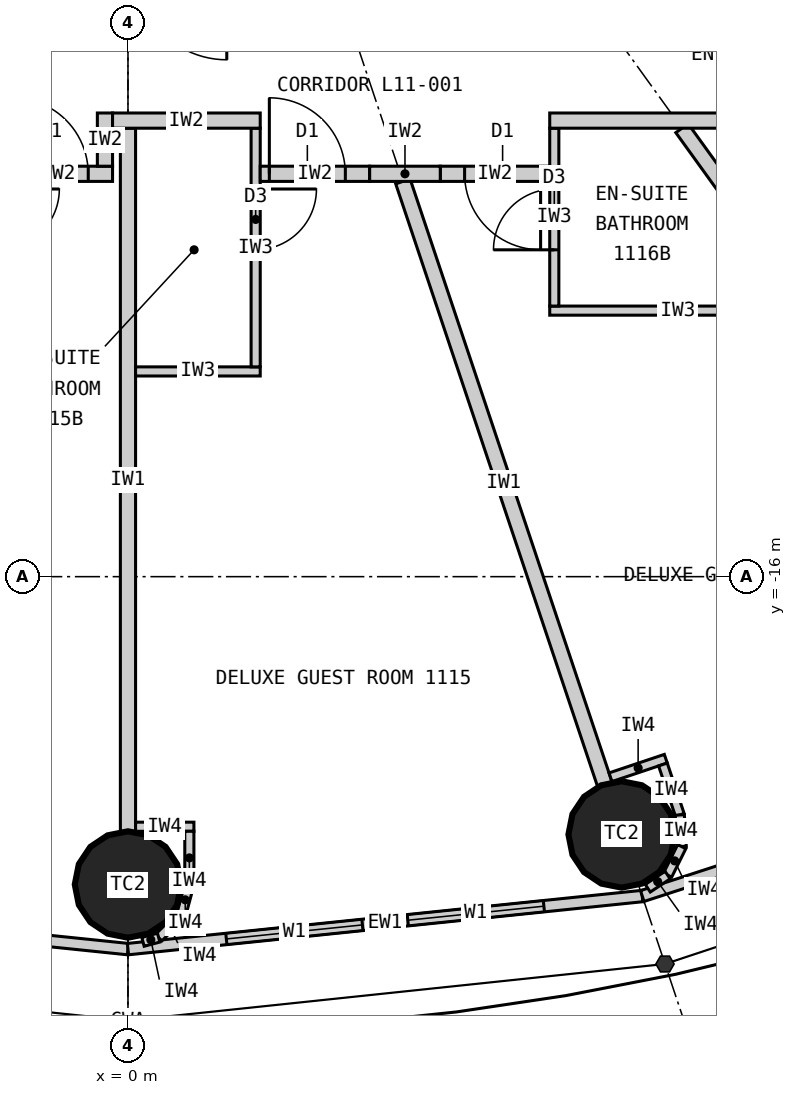
"""IFC4 building model, lengths in metres.
Left out: names, types, materials, properties, quantities, classifications, styles, units other than length and angle.
Written with IfcOpenShell. Run it as: python <this file> out.ifc"""

import sys

from ifc_helpers import new_model, si_unit, direction, frame, frame_2d, origin, origin_2d, place, context, subcontext, project, spatial, rectangle, circle, extrude, element, fill, save


model = new_model("IFC4")
c1 = context("Model", 3, precision=1e-05, world=origin(), true_north=direction((0.0, 1.0)))
c2 = subcontext(c1, "Body", "Model", "MODEL_VIEW")
j1 = project(units=[si_unit("LENGTHUNIT", "METRE"), si_unit("PLANEANGLEUNIT", "RADIAN")], contexts=[c1])
p1 = place(None, origin())
s1 = spatial("IfcSite", under=j1, at=p1, CompositionType="ELEMENT")
p2 = place(p1, origin())
s2 = spatial("IfcBuilding", under=s1, at=p2, CompositionType="ELEMENT")
p3 = place(p2, frame((0.0, 0.0, 50.7)))
s3 = spatial("IfcBuildingStorey", under=s2, at=p3, CompositionType="ELEMENT", Elevation=50.7)
for number, where, z_axis, x_axis in (
    (1, (0.0, -20.05, 0.0), (0.0, 0.0, 1.0), (1.0, 0.0, 0.0)),
    (2, (6.495, -19.391, 0.0), (0.0, 0.0, 1.0), (1.0, 0.0, 0.0)),
):
    element("IfcColumn", number, at=place(p3, frame(where, z_axis=z_axis, x_axis=x_axis)), inside=s3, PredefinedType="COLUMN", context=c2, shape_type="SweptSolid", body=[
        extrude(circle(Radius=0.7, at=origin_2d()), origin(), (0.0, 0.0, 1.0), 3.3),
    ])
p4 = place(p3, frame((-6.766, -20.202, 0.0), z_axis=(0.0, 0.0, 1.0), x_axis=(0.994721394369, -0.102612609291, 0.0)))
e3 = element("IfcWall", 3, at=p4, inside=s3, PredefinedType="ELEMENTEDWALL", context=c2, shape_type="SweptSolid", body=[
    extrude(rectangle(XDim=6.802, YDim=0.15, at=frame_2d((3.401, 0.0))), origin(), (0.0, 0.0, 1.0), 3.12),
])
p5 = place(p4, frame((1.301, 0.0, 0.9)))
e4 = element("IfcOpeningElement", 4, at=p5, cuts=e3, PredefinedType="OPENING", context=c2, shape_type="SweptSolid", body=[
    extrude(rectangle(XDim=1.8, YDim=1.9, at=frame_2d((0.9, 0.95))), frame((0.0, 0.085, 0.0), z_axis=(0.0, -1.0, 0.0), x_axis=(1.0, 0.0, 0.0)), (0.0, 0.0, 1.0), 0.17),
])
p6 = place(p4, frame((3.701, 0.0, 0.9)))
e5 = element("IfcOpeningElement", 5, at=p6, cuts=e3, PredefinedType="OPENING", context=c2, shape_type="SweptSolid", body=[
    extrude(rectangle(XDim=1.8, YDim=1.9, at=frame_2d((0.9, 0.95))), frame((0.0, 0.085, 0.0), z_axis=(0.0, -1.0, 0.0), x_axis=(1.0, 0.0, 0.0)), (0.0, 0.0, 1.0), 0.17),
])
p7 = place(p3, frame((0.0, -20.9, 0.0), z_axis=(0.0, 0.0, 1.0), x_axis=(0.994721394369, 0.102612609291, 0.0)))
e6 = element("IfcWall", 6, at=p7, inside=s3, PredefinedType="ELEMENTEDWALL", context=c2, shape_type="SweptSolid", body=[
    extrude(rectangle(XDim=6.802, YDim=0.15, at=frame_2d((3.401, 0.0))), origin(), (0.0, 0.0, 1.0), 3.12),
])
p8 = place(p7, frame((1.301, 0.0, 0.9)))
e7 = element("IfcOpeningElement", 7, at=p8, cuts=e6, PredefinedType="OPENING", context=c2, shape_type="SweptSolid", body=[
    extrude(rectangle(XDim=1.8, YDim=1.9, at=frame_2d((0.9, 0.95))), frame((0.0, 0.085, 0.0), z_axis=(0.0, -1.0, 0.0), x_axis=(1.0, 0.0, 0.0)), (0.0, 0.0, 1.0), 0.17),
])
p9 = place(p7, frame((3.701, 0.0, 0.9)))
e8 = element("IfcOpeningElement", 8, at=p9, cuts=e6, PredefinedType="OPENING", context=c2, shape_type="SweptSolid", body=[
    extrude(rectangle(XDim=1.8, YDim=1.9, at=frame_2d((0.9, 0.95))), frame((0.0, 0.085, 0.0), z_axis=(0.0, -1.0, 0.0), x_axis=(1.0, 0.0, 0.0)), (0.0, 0.0, 1.0), 0.17),
])
p10 = place(p3, frame((6.766, -20.202, 0.0), z_axis=(0.0, 0.0, 1.0), x_axis=(0.951137534625, 0.308767534285, 0.0)))
e9 = element("IfcWall", 9, at=p10, inside=s3, PredefinedType="ELEMENTEDWALL", context=c2, shape_type="SweptSolid", body=[
    extrude(rectangle(XDim=6.655, YDim=0.15, at=frame_2d((3.328, 0.0))), origin(), (0.0, 0.0, 1.0), 3.12),
])
p11 = place(p10, frame((1.228, 0.0, 0.9)))
e10 = element("IfcOpeningElement", 10, at=p11, cuts=e9, PredefinedType="OPENING", context=c2, shape_type="SweptSolid", body=[
    extrude(rectangle(XDim=1.8, YDim=1.9, at=frame_2d((0.9, 0.95))), frame((0.0, 0.085, 0.0), z_axis=(0.0, -1.0, 0.0), x_axis=(1.0, 0.0, 0.0)), (0.0, 0.0, 1.0), 0.17),
])
p12 = place(p10, frame((3.628, 0.0, 0.9)))
e11 = element("IfcOpeningElement", 11, at=p12, cuts=e9, PredefinedType="OPENING", context=c2, shape_type="SweptSolid", body=[
    extrude(rectangle(XDim=1.8, YDim=1.9, at=frame_2d((0.9, 0.95))), frame((0.0, 0.085, 0.0), z_axis=(0.0, -1.0, 0.0), x_axis=(1.0, 0.0, 0.0)), (0.0, 0.0, 1.0), 0.17),
])
p13 = place(p3, frame((0.0, -10.1, 0.0), z_axis=(0.0, 0.0, 1.0), x_axis=(0.0, -1.0, 0.0)))
e12 = element("IfcWall", 12, at=p13, inside=s3, PredefinedType="PARTITIONING", context=c2, shape_type="SweptSolid", body=[
    extrude(rectangle(XDim=9.25, YDim=0.2, at=frame_2d((4.625, 0.0))), origin(), (0.0, 0.0, 1.0), 2.32),
])
p14 = place(p3, frame((3.617, -10.8, 0.0), z_axis=(0.0, 0.0, 1.0), x_axis=(0.317576599239, -0.948232621046, 0.0)))
e13 = element("IfcWall", 13, at=p14, inside=s3, PredefinedType="PARTITIONING", context=c2, shape_type="SweptSolid", body=[
    extrude(rectangle(XDim=8.36, YDim=0.2, at=frame_2d((4.18, 0.0))), origin(), (0.0, 0.0, 1.0), 2.32),
])
p15 = place(p3, frame((7.289, -10.1, 0.0), z_axis=(0.0, 0.0, 1.0), x_axis=(0.585198353053, -0.810890182197, 0.0)))
e14 = element("IfcWall", 14, at=p15, inside=s3, PredefinedType="PARTITIONING", context=c2, shape_type="SweptSolid", body=[
    extrude(rectangle(XDim=8.36, YDim=0.2, at=frame_2d((4.18, 0.0))), origin(), (0.0, 0.0, 1.0), 2.32),
])
p16 = place(p3, frame((0.1, -13.3, 0.0), z_axis=(0.0, 0.0, 1.0), x_axis=(1.0, 0.0, 0.0)))
e15 = element("IfcWall", 15, at=p16, inside=s3, PredefinedType="PARTITIONING", context=c2, shape_type="SweptSolid", body=[
    extrude(rectangle(XDim=1.64, YDim=0.12, at=frame_2d((0.82, 0.0))), origin(), (0.0, 0.0, 1.0), 3.12),
])
p17 = place(p3, frame((1.68, -10.1, 0.0), z_axis=(0.0, 0.0, 1.0), x_axis=(0.0, -1.0, 0.0)))
e16 = element("IfcWall", 16, at=p17, inside=s3, PredefinedType="PARTITIONING", context=c2, shape_type="SweptSolid", body=[
    extrude(rectangle(XDim=3.14, YDim=0.12, at=frame_2d((1.57, 0.0))), origin(), (0.0, 0.0, 1.0), 3.12),
])
p18 = place(p17, frame((0.8, 0.0, 0.0)))
e17 = element("IfcOpeningElement", 17, at=p18, cuts=e16, PredefinedType="OPENING", context=c2, shape_type="SweptSolid", body=[
    extrude(rectangle(XDim=0.8, YDim=2.1, at=frame_2d((0.4, 1.05))), frame((0.0, 0.07, 0.0), z_axis=(0.0, -1.0, 0.0), x_axis=(1.0, 0.0, 0.0)), (0.0, 0.0, 1.0), 0.14),
])
p19 = place(p3, frame((8.921, -12.5, 0.0), z_axis=(0.0, 0.0, 1.0), x_axis=(-1.0, 0.0, 0.0)))
e18 = element("IfcWall", 18, at=p19, inside=s3, PredefinedType="PARTITIONING", context=c2, shape_type="SweptSolid", body=[
    extrude(rectangle(XDim=3.372, YDim=0.12, at=frame_2d((1.686, 0.0))), origin(), (0.0, 0.0, 1.0), 3.12),
])
p20 = place(p3, frame((5.609, -10.1, 0.0), z_axis=(0.0, 0.0, 1.0), x_axis=(0.0, -1.0, 0.0)))
e19 = element("IfcWall", 19, at=p20, inside=s3, PredefinedType="PARTITIONING", context=c2, shape_type="SweptSolid", body=[
    extrude(rectangle(XDim=2.34, YDim=0.12, at=frame_2d((1.17, 0.0))), origin(), (0.0, 0.0, 1.0), 3.12),
])
p21 = place(p20, frame((0.8, 0.0, 0.0)))
e20 = element("IfcOpeningElement", 20, at=p21, cuts=e19, PredefinedType="OPENING", context=c2, shape_type="SweptSolid", body=[
    extrude(rectangle(XDim=0.8, YDim=2.1, at=frame_2d((0.4, 1.05))), frame((0.0, 0.07, 0.0), z_axis=(0.0, -1.0, 0.0), x_axis=(1.0, 0.0, 0.0)), (0.0, 0.0, 1.0), 0.14),
])
p22 = place(p3, frame((-0.203, -10.7, 0.0), z_axis=(0.0, 0.0, 1.0), x_axis=(-1.0, 0.0, 0.0)))
e21 = element("IfcWall", 21, at=p22, inside=s3, PredefinedType="PARTITIONING", context=c2, shape_type="SweptSolid", body=[
    extrude(rectangle(XDim=1.44, YDim=0.2, at=frame_2d((0.72, 0.0))), origin(), (0.0, 0.0, 1.0), 3.12),
])
p23 = place(p22, frame((0.32, 0.0, 0.0)))
e22 = element("IfcOpeningElement", 22, at=p23, cuts=e21, PredefinedType="OPENING", context=c2, shape_type="SweptSolid", body=[
    extrude(rectangle(XDim=1.0, YDim=2.2, at=frame_2d((0.5, 1.1))), frame((0.0, 0.11, 0.0), z_axis=(0.0, -1.0, 0.0), x_axis=(1.0, 0.0, 0.0)), (0.0, 0.0, 1.0), 0.22),
])
p24 = place(p3, frame((-0.303, -9.9, 0.0), z_axis=(0.0, 0.0, 1.0), x_axis=(0.0, -1.0, 0.0)))
e23 = element("IfcWall", 23, at=p24, inside=s3, PredefinedType="PARTITIONING", context=c2, shape_type="SweptSolid", body=[
    extrude(rectangle(XDim=0.7, YDim=0.2, at=frame_2d((0.35, 0.0))), origin(), (0.0, 0.0, 1.0), 3.12),
])
p25 = place(p3, frame((3.18, -10.7, 0.0), z_axis=(0.0, 0.0, 1.0), x_axis=(-1.0, 0.0, 0.0)))
e24 = element("IfcWall", 24, at=p25, inside=s3, PredefinedType="PARTITIONING", context=c2, shape_type="SweptSolid", body=[
    extrude(rectangle(XDim=1.44, YDim=0.2, at=frame_2d((0.72, 0.0))), origin(), (0.0, 0.0, 1.0), 3.12),
])
p26 = place(p25, frame((0.32, 0.0, 0.0)))
e25 = element("IfcOpeningElement", 25, at=p26, cuts=e24, PredefinedType="OPENING", context=c2, shape_type="SweptSolid", body=[
    extrude(rectangle(XDim=1.0, YDim=2.2, at=frame_2d((0.5, 1.1))), frame((0.0, 0.11, 0.0), z_axis=(0.0, -1.0, 0.0), x_axis=(1.0, 0.0, 0.0)), (0.0, 0.0, 1.0), 0.22),
])
p27 = place(p3, frame((5.549, -10.7, 0.0), z_axis=(0.0, 0.0, 1.0), x_axis=(-1.0, 0.0, 0.0)))
e26 = element("IfcWall", 26, at=p27, inside=s3, PredefinedType="PARTITIONING", context=c2, shape_type="SweptSolid", body=[
    extrude(rectangle(XDim=1.44, YDim=0.2, at=frame_2d((0.72, 0.0))), origin(), (0.0, 0.0, 1.0), 3.12),
])
p28 = place(p27, frame((0.12, 0.0, 0.0)))
e27 = element("IfcOpeningElement", 27, at=p28, cuts=e26, PredefinedType="OPENING", context=c2, shape_type="SweptSolid", body=[
    extrude(rectangle(XDim=1.0, YDim=2.2, at=frame_2d((0.5, 1.1))), frame((0.0, 0.11, 0.0), z_axis=(0.0, -1.0, 0.0), x_axis=(1.0, 0.0, 0.0)), (0.0, 0.0, 1.0), 0.22),
])
p29 = place(p3, frame((4.109, -10.7, 0.0), z_axis=(0.0, 0.0, 1.0), x_axis=(-1.0, 0.0, 0.0)))
e28 = element("IfcWall", 28, at=p29, inside=s3, PredefinedType="PARTITIONING", context=c2, shape_type="SweptSolid", body=[
    extrude(rectangle(XDim=0.929, YDim=0.2, at=frame_2d((0.465, 0.0))), origin(), (0.0, 0.0, 1.0), 3.12),
])
p30 = place(p3, frame((10.179, -10.0, 0.0), z_axis=(0.0, 0.0, 1.0), x_axis=(-1.0, 0.0, 0.0)))
e29 = element("IfcWall", 29, at=p30, inside=s3, PredefinedType="PARTITIONING", context=c2, shape_type="SweptSolid", body=[
    extrude(rectangle(XDim=4.63, YDim=0.2, at=frame_2d((2.315, 0.0))), origin(), (0.0, 0.0, 1.0), 3.12),
])
p31 = place(p3, frame((1.74, -10.0, 0.0), z_axis=(0.0, 0.0, 1.0), x_axis=(-1.0, 0.0, 0.0)))
e30 = element("IfcWall", 30, at=p31, inside=s3, PredefinedType="PARTITIONING", context=c2, shape_type="SweptSolid", body=[
    extrude(rectangle(XDim=1.943, YDim=0.2, at=frame_2d((0.971, 0.0))), origin(), (0.0, 0.0, 1.0), 3.12),
])
p32 = place(p3, frame((0.1, -19.29, 0.0), z_axis=(0.0, 0.0, 1.0), x_axis=(1.0, 0.0, 0.0)))
e31 = element("IfcWall", 31, at=p32, inside=s3, PredefinedType="PARTITIONING", context=c2, shape_type="SweptSolid", body=[
    extrude(rectangle(XDim=0.767, YDim=0.12, at=frame_2d((0.384, 0.0))), origin(), (0.0, 0.0, 1.0), 3.12),
])
p33 = place(p3, frame((0.808, -19.35, 0.0), z_axis=(0.0, 0.0, 1.0), x_axis=(0.0, -1.0, 0.0)))
e32 = element("IfcWall", 32, at=p33, inside=s3, PredefinedType="PARTITIONING", context=c2, shape_type="SweptSolid", body=[
    extrude(rectangle(XDim=0.7, YDim=0.12, at=frame_2d((0.35, 0.0))), origin(), (0.0, 0.0, 1.0), 3.12),
])
p34 = place(p3, frame((0.808, -20.05, 0.0), z_axis=(0.0, 0.0, 1.0), x_axis=(-0.2592614205, -0.965807183573, 0.0)))
e33 = element("IfcWall", 33, at=p34, inside=s3, PredefinedType="PARTITIONING", context=c2, shape_type="SweptSolid", body=[
    extrude(rectangle(XDim=0.418, YDim=0.12, at=frame_2d((0.209, 0.0))), origin(), (0.0, 0.0, 1.0), 3.12),
])
p35 = place(p3, frame((0.699, -20.454, 0.0), z_axis=(0.0, 0.0, 1.0), x_axis=(-0.707106781187, -0.707106781187, 0.0)))
e34 = element("IfcWall", 34, at=p35, inside=s3, PredefinedType="PARTITIONING", context=c2, shape_type="SweptSolid", body=[
    extrude(rectangle(XDim=0.418, YDim=0.12, at=frame_2d((0.209, 0.0))), origin(), (0.0, 0.0, 1.0), 3.12),
])
p36 = place(p3, frame((0.404, -20.749, 0.0), z_axis=(0.0, 0.0, 1.0), x_axis=(-0.965759066438, -0.25944060128, 0.0)))
e35 = element("IfcWall", 35, at=p36, inside=s3, PredefinedType="PARTITIONING", context=c2, shape_type="SweptSolid", body=[
    extrude(rectangle(XDim=0.214, YDim=0.12, at=frame_2d((0.107, 0.0))), origin(), (0.0, 0.0, 1.0), 3.12),
])
p37 = place(p3, frame((6.348, -18.639, 0.0), z_axis=(0.0, 0.0, 1.0), x_axis=(0.948268951266, 0.317468102437, 0.0)))
e36 = element("IfcWall", 36, at=p37, inside=s3, PredefinedType="PARTITIONING", context=c2, shape_type="SweptSolid", body=[
    extrude(rectangle(XDim=0.768, YDim=0.12, at=frame_2d((0.384, 0.0))), origin(), (0.0, 0.0, 1.0), 3.12),
])
p38 = place(p3, frame((7.038, -18.471, 0.0), z_axis=(0.0, 0.0, 1.0), x_axis=(0.317378466199, -0.9482989556, 0.0)))
e37 = element("IfcWall", 37, at=p38, inside=s3, PredefinedType="PARTITIONING", context=c2, shape_type="SweptSolid", body=[
    extrude(rectangle(XDim=0.7, YDim=0.12, at=frame_2d((0.35, 0.0))), origin(), (0.0, 0.0, 1.0), 3.12),
])
p39 = place(p3, frame((7.26, -19.135, 0.0), z_axis=(0.0, 0.0, 1.0), x_axis=(0.0613238046, -0.99811792439, 0.0)))
e38 = element("IfcWall", 38, at=p39, inside=s3, PredefinedType="PARTITIONING", context=c2, shape_type="SweptSolid", body=[
    extrude(rectangle(XDim=0.418, YDim=0.12, at=frame_2d((0.209, 0.0))), origin(), (0.0, 0.0, 1.0), 3.12),
])
p40 = place(p3, frame((7.286, -19.552, 0.0), z_axis=(0.0, 0.0, 1.0), x_axis=(-0.445810757773, -0.89512723579, 0.0)))
e39 = element("IfcWall", 39, at=p40, inside=s3, PredefinedType="PARTITIONING", context=c2, shape_type="SweptSolid", body=[
    extrude(rectangle(XDim=0.418, YDim=0.12, at=frame_2d((0.209, 0.0))), origin(), (0.0, 0.0, 1.0), 3.12),
])
p41 = place(p3, frame((7.1, -19.926, 0.0), z_axis=(0.0, 0.0, 1.0), x_axis=(-0.833488262509, -0.552537162787, 0.0)))
e40 = element("IfcWall", 40, at=p41, inside=s3, PredefinedType="PARTITIONING", context=c2, shape_type="SweptSolid", body=[
    extrude(rectangle(XDim=0.313, YDim=0.12, at=frame_2d((0.156, 0.0))), origin(), (0.0, 0.0, 1.0), 3.12),
])
p42 = place(p8, origin())
e41 = element("IfcWindow", 41, at=p42, inside=s3, PartitioningType="SINGLE_PANEL", PredefinedType="WINDOW", context=c2, shape_type="SweptSolid", body=[
    extrude(rectangle(XDim=1.8, YDim=1.9, at=frame_2d((0.9, 0.95))), frame((0.0, 0.03, 0.0), z_axis=(0.0, -1.0, 0.0), x_axis=(1.0, 0.0, 0.0)), (0.0, 0.0, 1.0), 0.06),
])
fill(e7, e41)
p43 = place(p9, origin())
e42 = element("IfcWindow", 42, at=p43, inside=s3, PartitioningType="SINGLE_PANEL", PredefinedType="WINDOW", context=c2, shape_type="SweptSolid", body=[
    extrude(rectangle(XDim=1.8, YDim=1.9, at=frame_2d((0.9, 0.95))), frame((0.0, 0.03, 0.0), z_axis=(0.0, -1.0, 0.0), x_axis=(1.0, 0.0, 0.0)), (0.0, 0.0, 1.0), 0.06),
])
fill(e8, e42)
p44 = place(p23, origin())
e43 = element("IfcDoor", 43, at=p44, inside=s3, OperationType="SINGLE_SWING_RIGHT", PredefinedType="DOOR", context=c2, shape_type="SweptSolid", body=[
    extrude(rectangle(XDim=1.0, YDim=2.2, at=frame_2d((0.5, 1.1))), frame((0.0, 0.025, 0.0), z_axis=(0.0, -1.0, 0.0), x_axis=(1.0, 0.0, 0.0)), (0.0, 0.0, 1.0), 0.05),
])
fill(e22, e43)
p45 = place(p18, origin())
e44 = element("IfcDoor", 44, at=p45, inside=s3, OperationType="SINGLE_SWING_LEFT", PredefinedType="DOOR", context=c2, shape_type="SweptSolid", body=[
    extrude(rectangle(XDim=0.8, YDim=2.1, at=frame_2d((0.4, 1.05))), frame((0.0, 0.025, 0.0), z_axis=(0.0, -1.0, 0.0), x_axis=(1.0, 0.0, 0.0)), (0.0, 0.0, 1.0), 0.05),
])
fill(e17, e44)
p46 = place(p26, origin())
e45 = element("IfcDoor", 45, at=p46, inside=s3, OperationType="SINGLE_SWING_RIGHT", PredefinedType="DOOR", context=c2, shape_type="SweptSolid", body=[
    extrude(rectangle(XDim=1.0, YDim=2.2, at=frame_2d((0.5, 1.1))), frame((0.0, 0.025, 0.0), z_axis=(0.0, -1.0, 0.0), x_axis=(1.0, 0.0, 0.0)), (0.0, 0.0, 1.0), 0.05),
])
fill(e25, e45)
p47 = place(p21, origin())
e46 = element("IfcDoor", 46, at=p47, inside=s3, OperationType="SINGLE_SWING_RIGHT", PredefinedType="DOOR", context=c2, shape_type="SweptSolid", body=[
    extrude(rectangle(XDim=0.8, YDim=2.1, at=frame_2d((0.4, 1.05))), frame((0.0, 0.025, 0.0), z_axis=(0.0, -1.0, 0.0), x_axis=(1.0, 0.0, 0.0)), (0.0, 0.0, 1.0), 0.05),
])
fill(e20, e46)
p48 = place(p28, origin())
e47 = element("IfcDoor", 47, at=p48, inside=s3, OperationType="SINGLE_SWING_LEFT", PredefinedType="DOOR", context=c2, shape_type="SweptSolid", body=[
    extrude(rectangle(XDim=1.0, YDim=2.2, at=frame_2d((0.5, 1.1))), frame((0.0, 0.025, 0.0), z_axis=(0.0, -1.0, 0.0), x_axis=(1.0, 0.0, 0.0)), (0.0, 0.0, 1.0), 0.05),
])
fill(e27, e47)
save(model, sys.argv[1])
